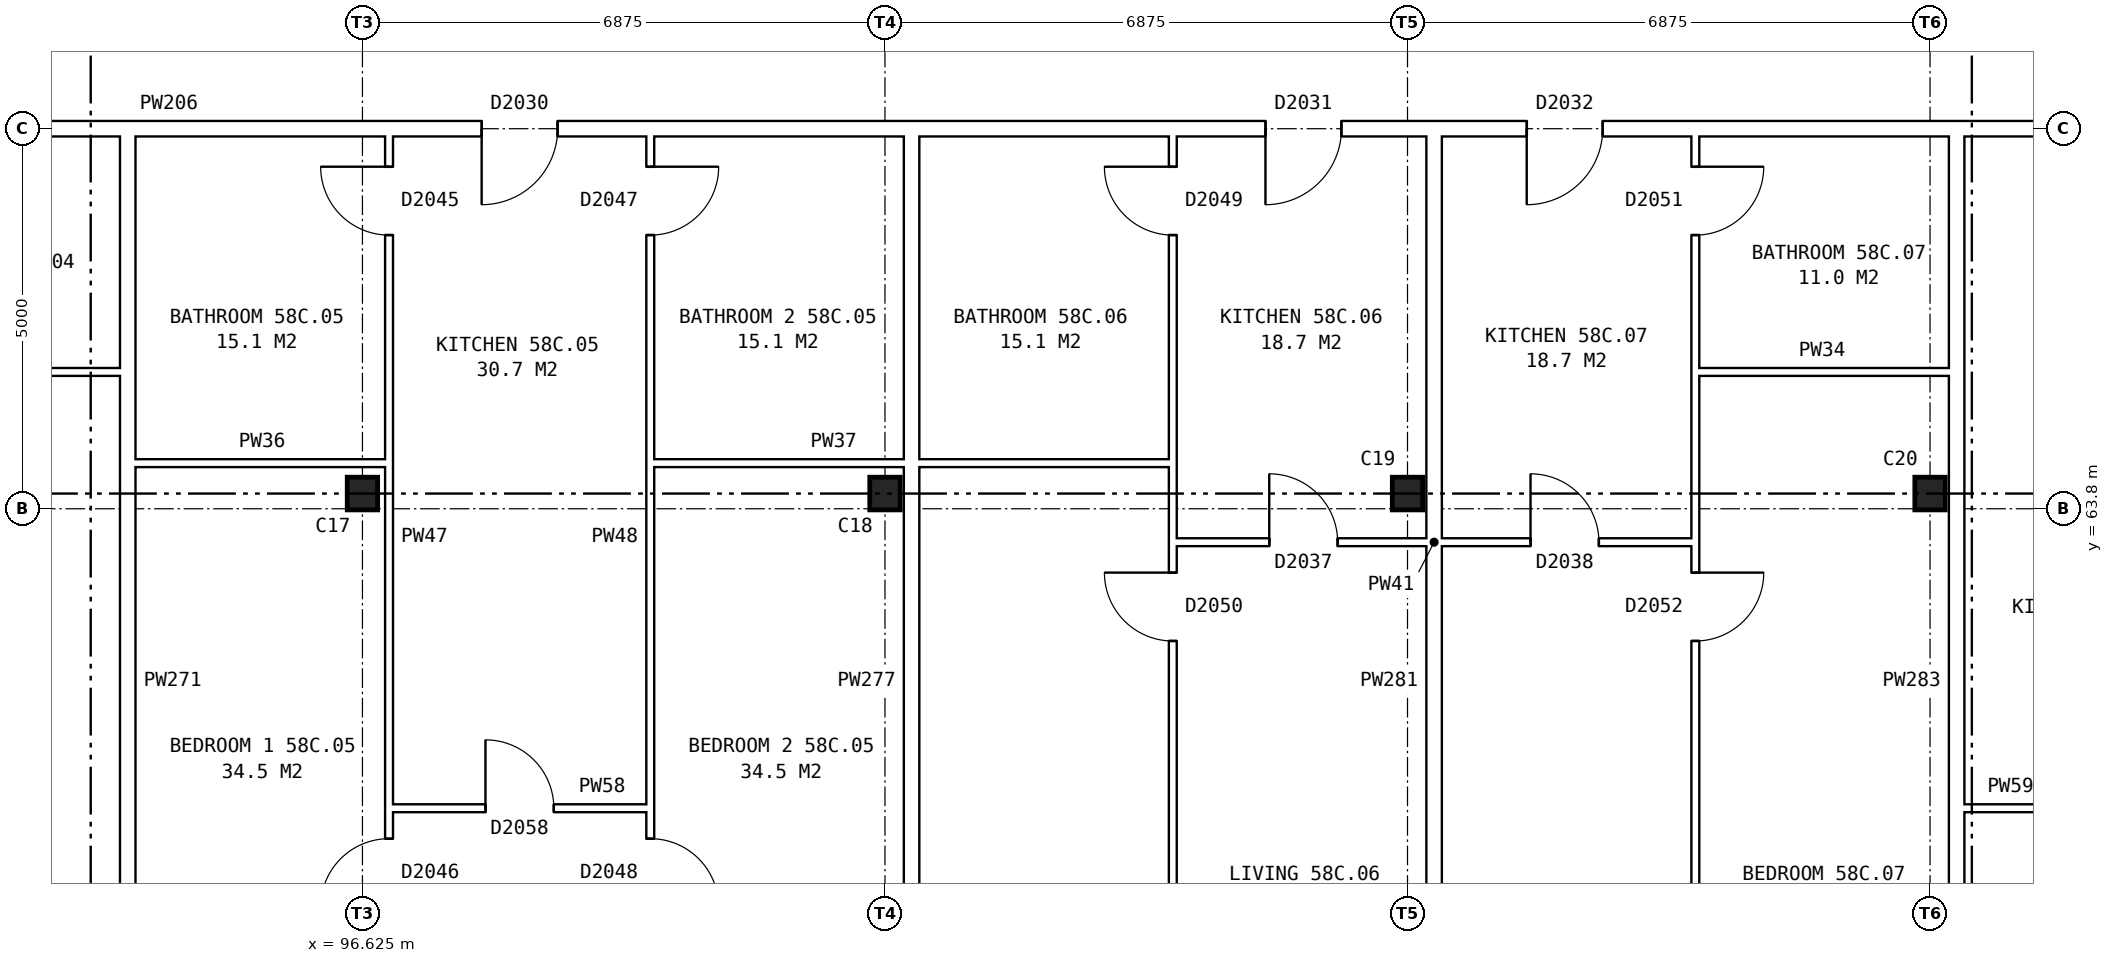
"""IFC4 building model, lengths in metres.
Left out: names, types, materials, properties, quantities, classifications, styles, units other than length and angle.
Written with IfcOpenShell. Run it as: python <this file> out.ifc"""

import sys

from ifc_helpers import new_model, si_unit, direction, frame, frame_2d, origin, origin_2d, place, context, subcontext, project, spatial, rectangle, i_section, extrude, element, fill, save


model = new_model("IFC4")
c1 = context("Model", 3, precision=1e-05, world=origin(), true_north=direction((0.0, 1.0)))
c2 = subcontext(c1, "Body", "Model", "MODEL_VIEW")
j1 = project(units=[si_unit("LENGTHUNIT", "METRE"), si_unit("PLANEANGLEUNIT", "RADIAN")], contexts=[c1])
p1 = place(None, origin())
s1 = spatial("IfcSite", under=j1, at=p1, CompositionType="ELEMENT")
p2 = place(p1, origin())
s2 = spatial("IfcBuilding", under=s1, at=p2, CompositionType="ELEMENT")
p3 = place(p2, frame((0.0, 0.0, 205.9)))
s3 = spatial("IfcBuildingStorey", under=s2, at=p3, CompositionType="ELEMENT", Elevation=205.9)
for number, where, z_axis, x_axis in (
    (1, (96.625, 64.0, 0.0), (0.0, 0.0, 1.0), (1.0, 0.0, 0.0)),
    (2, (103.5, 64.0, 0.0), (0.0, 0.0, 1.0), (1.0, 0.0, 0.0)),
    (3, (110.375, 64.0, 0.0), (0.0, 0.0, 1.0), (1.0, 0.0, 0.0)),
    (4, (117.25, 64.0, 0.0), (0.0, 0.0, 1.0), (1.0, 0.0, 0.0)),
):
    element("IfcColumn", number, at=place(p3, frame(where, z_axis=z_axis, x_axis=x_axis)), inside=s3, PredefinedType="COLUMN", context=c2, shape_type="SweptSolid", body=[
        extrude(i_section(OverallWidth=0.4, OverallDepth=0.43, WebThickness=0.04, FlangeThickness=0.04, at=origin_2d()), origin(), (0.0, 0.0, 1.0), 2.85),
    ])
p4 = place(p3, frame((96.975, 59.86, 0.0), z_axis=(0.0, 0.0, 1.0), x_axis=(1.0, 0.0, 0.0)))
e5 = element("IfcWall", 5, at=p4, inside=s3, PredefinedType="PARTITIONING", context=c2, shape_type="SweptSolid", body=[
    extrude(rectangle(XDim=3.437, YDim=0.1, at=frame_2d((1.719, 0.0))), origin(), (0.0, 0.0, 1.0), 2.85),
])
p5 = place(p4, frame((1.269, 0.0, 0.0)))
e6 = element("IfcOpeningElement", 6, at=p5, cuts=e5, PredefinedType="OPENING", context=c2, shape_type="SweptSolid", body=[
    extrude(rectangle(XDim=0.9, YDim=2.1, at=frame_2d((0.45, 1.05))), frame((0.0, 0.06, 0.0), z_axis=(0.0, -1.0, 0.0), x_axis=(1.0, 0.0, 0.0)), (0.0, 0.0, 1.0), 0.12),
])
p6 = place(p3, frame((117.7, 59.86, 0.0), z_axis=(0.0, 0.0, 1.0), x_axis=(1.0, 0.0, 0.0)))
e7 = element("IfcWall", 7, at=p6, inside=s3, PredefinedType="PARTITIONING", context=c2, shape_type="SweptSolid", body=[
    extrude(rectangle(XDim=3.337, YDim=0.1, at=frame_2d((1.668, 0.0))), origin(), (0.0, 0.0, 1.0), 2.85),
])
p7 = place(p6, frame((1.219, 0.0, 0.0)))
e8 = element("IfcOpeningElement", 8, at=p7, cuts=e7, PredefinedType="OPENING", context=c2, shape_type="SweptSolid", body=[
    extrude(rectangle(XDim=0.9, YDim=2.1, at=frame_2d((0.45, 1.05))), frame((0.0, 0.06, 0.0), z_axis=(0.0, -1.0, 0.0), x_axis=(1.0, 0.0, 0.0)), (0.0, 0.0, 1.0), 0.12),
])
p8 = place(p3, frame((107.287, 63.36, 0.0), z_axis=(0.0, 0.0, 1.0), x_axis=(1.0, 0.0, 0.0)))
e9 = element("IfcWall", 9, at=p8, inside=s3, PredefinedType="PARTITIONING", context=c2, shape_type="SweptSolid", body=[
    extrude(rectangle(XDim=6.875, YDim=0.1, at=frame_2d((3.438, 0.0))), origin(), (0.0, 0.0, 1.0), 2.85),
])
p9 = place(p8, frame((1.269, 0.0, 0.0)))
e10 = element("IfcOpeningElement", 10, at=p9, cuts=e9, PredefinedType="OPENING", context=c2, shape_type="SweptSolid", body=[
    extrude(rectangle(XDim=0.9, YDim=2.1, at=frame_2d((0.45, 1.05))), frame((0.0, 0.06, 0.0), z_axis=(0.0, -1.0, 0.0), x_axis=(1.0, 0.0, 0.0)), (0.0, 0.0, 1.0), 0.12),
])
p10 = place(p8, frame((4.707, 0.0, 0.0)))
e11 = element("IfcOpeningElement", 11, at=p10, cuts=e9, PredefinedType="OPENING", context=c2, shape_type="SweptSolid", body=[
    extrude(rectangle(XDim=0.9, YDim=2.1, at=frame_2d((0.45, 1.05))), frame((0.0, 0.06, 0.0), z_axis=(0.0, -1.0, 0.0), x_axis=(1.0, 0.0, 0.0)), (0.0, 0.0, 1.0), 0.12),
])
p11 = place(p3, frame((93.637, 64.4, 0.0), z_axis=(0.0, 0.0, 1.0), x_axis=(1.0, 0.0, 0.0)))
e12 = element("IfcWall", 12, at=p11, inside=s3, PredefinedType="PARTITIONING", context=c2, shape_type="SweptSolid", body=[
    extrude(rectangle(XDim=3.338, YDim=0.1, at=frame_2d((1.669, 0.0))), origin(), (0.0, 0.0, 1.0), 2.85),
])
p12 = place(p3, frame((100.412, 64.4, 0.0), z_axis=(0.0, 0.0, 1.0), x_axis=(1.0, 0.0, 0.0)))
e13 = element("IfcWall", 13, at=p12, inside=s3, PredefinedType="PARTITIONING", context=c2, shape_type="SweptSolid", body=[
    extrude(rectangle(XDim=6.875, YDim=0.1, at=frame_2d((3.438, 0.0))), origin(), (0.0, 0.0, 1.0), 2.85),
])
p13 = place(p3, frame((90.1, 65.6, 0.0), z_axis=(0.0, 0.0, 1.0), x_axis=(1.0, 0.0, 0.0)))
e14 = element("IfcWall", 14, at=p13, inside=s3, PredefinedType="PARTITIONING", context=c2, shape_type="SweptSolid", body=[
    extrude(rectangle(XDim=3.337, YDim=0.1, at=frame_2d((1.668, 0.0))), origin(), (0.0, 0.0, 1.0), 2.85),
])
p14 = place(p3, frame((114.162, 65.6, 0.0), z_axis=(0.0, 0.0, 1.0), x_axis=(1.0, 0.0, 0.0)))
e15 = element("IfcWall", 15, at=p14, inside=s3, PredefinedType="PARTITIONING", context=c2, shape_type="SweptSolid", body=[
    extrude(rectangle(XDim=3.338, YDim=0.1, at=frame_2d((1.669, 0.0))), origin(), (0.0, 0.0, 1.0), 2.85),
])
p15 = place(p3, frame((75.64, 68.8, 0.0), z_axis=(0.0, 0.0, 1.0), x_axis=(1.0, 0.0, 0.0)))
e16 = element("IfcWall", 16, at=p15, inside=s3, PredefinedType="PARTITIONING", context=c2, shape_type="SweptSolid", body=[
    extrude(rectangle(XDim=55.72, YDim=0.2, at=frame_2d((27.86, 0.0))), origin(), (0.0, 0.0, 1.0), 2.85),
])
p16 = place(p15, frame((5.191, 0.0, 0.0)))
e17 = element("IfcOpeningElement", 17, at=p16, cuts=e16, PredefinedType="OPENING", context=c2, shape_type="SweptSolid", body=[
    extrude(rectangle(XDim=1.0, YDim=2.1, at=frame_2d((0.5, 1.05))), frame((0.0, 0.11, 0.0), z_axis=(0.0, -1.0, 0.0), x_axis=(1.0, 0.0, 0.0)), (0.0, 0.0, 1.0), 0.22),
])
p17 = place(p15, frame((12.241, 0.0, 0.0)))
e18 = element("IfcOpeningElement", 18, at=p17, cuts=e16, PredefinedType="OPENING", context=c2, shape_type="SweptSolid", body=[
    extrude(rectangle(XDim=1.0, YDim=2.1, at=frame_2d((0.5, 1.05))), frame((0.0, 0.11, 0.0), z_axis=(0.0, -1.0, 0.0), x_axis=(1.0, 0.0, 0.0)), (0.0, 0.0, 1.0), 0.22),
])
p18 = place(p15, frame((22.553, 0.0, 0.0)))
e19 = element("IfcOpeningElement", 19, at=p18, cuts=e16, PredefinedType="OPENING", context=c2, shape_type="SweptSolid", body=[
    extrude(rectangle(XDim=1.0, YDim=2.1, at=frame_2d((0.5, 1.05))), frame((0.0, 0.11, 0.0), z_axis=(0.0, -1.0, 0.0), x_axis=(1.0, 0.0, 0.0)), (0.0, 0.0, 1.0), 0.22),
])
p19 = place(p15, frame((32.866, 0.0, 0.0)))
e20 = element("IfcOpeningElement", 20, at=p19, cuts=e16, PredefinedType="OPENING", context=c2, shape_type="SweptSolid", body=[
    extrude(rectangle(XDim=1.0, YDim=2.1, at=frame_2d((0.5, 1.05))), frame((0.0, 0.11, 0.0), z_axis=(0.0, -1.0, 0.0), x_axis=(1.0, 0.0, 0.0)), (0.0, 0.0, 1.0), 0.22),
])
p20 = place(p15, frame((36.303, 0.0, 0.0)))
e21 = element("IfcOpeningElement", 21, at=p20, cuts=e16, PredefinedType="OPENING", context=c2, shape_type="SweptSolid", body=[
    extrude(rectangle(XDim=1.0, YDim=2.1, at=frame_2d((0.5, 1.05))), frame((0.0, 0.11, 0.0), z_axis=(0.0, -1.0, 0.0), x_axis=(1.0, 0.0, 0.0)), (0.0, 0.0, 1.0), 0.22),
])
p21 = place(p15, frame((43.178, 0.0, 0.0)))
e22 = element("IfcOpeningElement", 22, at=p21, cuts=e16, PredefinedType="OPENING", context=c2, shape_type="SweptSolid", body=[
    extrude(rectangle(XDim=1.0, YDim=2.1, at=frame_2d((0.5, 1.05))), frame((0.0, 0.11, 0.0), z_axis=(0.0, -1.0, 0.0), x_axis=(1.0, 0.0, 0.0)), (0.0, 0.0, 1.0), 0.22),
])
p22 = place(p15, frame((50.053, 0.0, 0.0)))
e23 = element("IfcOpeningElement", 23, at=p22, cuts=e16, PredefinedType="OPENING", context=c2, shape_type="SweptSolid", body=[
    extrude(rectangle(XDim=1.0, YDim=2.1, at=frame_2d((0.5, 1.05))), frame((0.0, 0.11, 0.0), z_axis=(0.0, -1.0, 0.0), x_axis=(1.0, 0.0, 0.0)), (0.0, 0.0, 1.0), 0.22),
])
p23 = place(p3, frame((93.537, 54.36, 0.0), z_axis=(0.0, 0.0, 1.0), x_axis=(0.0, 1.0, 0.0)))
e24 = element("IfcWall", 24, at=p23, inside=s3, PredefinedType="PARTITIONING", context=c2, shape_type="SweptSolid", body=[
    extrude(rectangle(XDim=14.34, YDim=0.2, at=frame_2d((7.17, 0.0))), origin(), (0.0, 0.0, 1.0), 2.85),
])
p24 = place(p3, frame((96.975, 54.36, 0.0), z_axis=(0.0, 0.0, 1.0), x_axis=(0.0, 1.0, 0.0)))
e25 = element("IfcWall", 25, at=p24, inside=s3, PredefinedType="PARTITIONING", context=c2, shape_type="SweptSolid", body=[
    extrude(rectangle(XDim=14.34, YDim=0.1, at=frame_2d((7.17, 0.0))), origin(), (0.0, 0.0, 1.0), 2.85),
])
p25 = place(p24, frame((4.2, 0.0, 0.0)))
e26 = element("IfcOpeningElement", 26, at=p25, cuts=e25, PredefinedType="OPENING", context=c2, shape_type="SweptSolid", body=[
    extrude(rectangle(XDim=0.9, YDim=2.1, at=frame_2d((0.45, 1.05))), frame((0.0, 0.06, 0.0), z_axis=(0.0, -1.0, 0.0), x_axis=(1.0, 0.0, 0.0)), (0.0, 0.0, 1.0), 0.12),
])
p26 = place(p24, frame((13.04, 0.0, 0.0)))
e27 = element("IfcOpeningElement", 27, at=p26, cuts=e25, PredefinedType="OPENING", context=c2, shape_type="SweptSolid", body=[
    extrude(rectangle(XDim=0.9, YDim=2.1, at=frame_2d((0.45, 1.05))), frame((0.0, 0.06, 0.0), z_axis=(0.0, -1.0, 0.0), x_axis=(1.0, 0.0, 0.0)), (0.0, 0.0, 1.0), 0.12),
])
p27 = place(p3, frame((100.412, 54.36, 0.0), z_axis=(0.0, 0.0, 1.0), x_axis=(0.0, 1.0, 0.0)))
e28 = element("IfcWall", 28, at=p27, inside=s3, PredefinedType="PARTITIONING", context=c2, shape_type="SweptSolid", body=[
    extrude(rectangle(XDim=14.34, YDim=0.1, at=frame_2d((7.17, 0.0))), origin(), (0.0, 0.0, 1.0), 2.85),
])
p28 = place(p27, frame((4.2, 0.0, 0.0)))
e29 = element("IfcOpeningElement", 29, at=p28, cuts=e28, PredefinedType="OPENING", context=c2, shape_type="SweptSolid", body=[
    extrude(rectangle(XDim=0.9, YDim=2.1, at=frame_2d((0.45, 1.05))), frame((0.0, 0.06, 0.0), z_axis=(0.0, -1.0, 0.0), x_axis=(1.0, 0.0, 0.0)), (0.0, 0.0, 1.0), 0.12),
])
p29 = place(p27, frame((13.04, 0.0, 0.0)))
e30 = element("IfcOpeningElement", 30, at=p29, cuts=e28, PredefinedType="OPENING", context=c2, shape_type="SweptSolid", body=[
    extrude(rectangle(XDim=0.9, YDim=2.1, at=frame_2d((0.45, 1.05))), frame((0.0, 0.06, 0.0), z_axis=(0.0, -1.0, 0.0), x_axis=(1.0, 0.0, 0.0)), (0.0, 0.0, 1.0), 0.12),
])
p30 = place(p3, frame((103.85, 54.36, 0.0), z_axis=(0.0, 0.0, 1.0), x_axis=(0.0, 1.0, 0.0)))
e31 = element("IfcWall", 31, at=p30, inside=s3, PredefinedType="PARTITIONING", context=c2, shape_type="SweptSolid", body=[
    extrude(rectangle(XDim=14.34, YDim=0.2, at=frame_2d((7.17, 0.0))), origin(), (0.0, 0.0, 1.0), 2.85),
])
p31 = place(p3, frame((107.287, 54.36, 0.0), z_axis=(0.0, 0.0, 1.0), x_axis=(0.0, 1.0, 0.0)))
e32 = element("IfcWall", 32, at=p31, inside=s3, PredefinedType="PARTITIONING", context=c2, shape_type="SweptSolid", body=[
    extrude(rectangle(XDim=14.34, YDim=0.1, at=frame_2d((7.17, 0.0))), origin(), (0.0, 0.0, 1.0), 2.85),
])
p32 = place(p31, frame((7.7, 0.0, 0.0)))
e33 = element("IfcOpeningElement", 33, at=p32, cuts=e32, PredefinedType="OPENING", context=c2, shape_type="SweptSolid", body=[
    extrude(rectangle(XDim=0.9, YDim=2.1, at=frame_2d((0.45, 1.05))), frame((0.0, 0.06, 0.0), z_axis=(0.0, -1.0, 0.0), x_axis=(1.0, 0.0, 0.0)), (0.0, 0.0, 1.0), 0.12),
])
p33 = place(p31, frame((13.04, 0.0, 0.0)))
e34 = element("IfcOpeningElement", 34, at=p33, cuts=e32, PredefinedType="OPENING", context=c2, shape_type="SweptSolid", body=[
    extrude(rectangle(XDim=0.9, YDim=2.1, at=frame_2d((0.45, 1.05))), frame((0.0, 0.06, 0.0), z_axis=(0.0, -1.0, 0.0), x_axis=(1.0, 0.0, 0.0)), (0.0, 0.0, 1.0), 0.12),
])
p34 = place(p3, frame((110.725, 54.36, 0.0), z_axis=(0.0, 0.0, 1.0), x_axis=(0.0, 1.0, 0.0)))
e35 = element("IfcWall", 35, at=p34, inside=s3, PredefinedType="PARTITIONING", context=c2, shape_type="SweptSolid", body=[
    extrude(rectangle(XDim=14.34, YDim=0.2, at=frame_2d((7.17, 0.0))), origin(), (0.0, 0.0, 1.0), 2.85),
])
p35 = place(p3, frame((114.162, 54.36, 0.0), z_axis=(0.0, 0.0, 1.0), x_axis=(0.0, 1.0, 0.0)))
e36 = element("IfcWall", 36, at=p35, inside=s3, PredefinedType="PARTITIONING", context=c2, shape_type="SweptSolid", body=[
    extrude(rectangle(XDim=14.34, YDim=0.1, at=frame_2d((7.17, 0.0))), origin(), (0.0, 0.0, 1.0), 2.85),
])
p36 = place(p35, frame((7.7, 0.0, 0.0)))
e37 = element("IfcOpeningElement", 37, at=p36, cuts=e36, PredefinedType="OPENING", context=c2, shape_type="SweptSolid", body=[
    extrude(rectangle(XDim=0.9, YDim=2.1, at=frame_2d((0.45, 1.05))), frame((0.0, 0.06, 0.0), z_axis=(0.0, -1.0, 0.0), x_axis=(1.0, 0.0, 0.0)), (0.0, 0.0, 1.0), 0.12),
])
p37 = place(p35, frame((13.04, 0.0, 0.0)))
e38 = element("IfcOpeningElement", 38, at=p37, cuts=e36, PredefinedType="OPENING", context=c2, shape_type="SweptSolid", body=[
    extrude(rectangle(XDim=0.9, YDim=2.1, at=frame_2d((0.45, 1.05))), frame((0.0, 0.06, 0.0), z_axis=(0.0, -1.0, 0.0), x_axis=(1.0, 0.0, 0.0)), (0.0, 0.0, 1.0), 0.12),
])
p38 = place(p3, frame((117.6, 54.36, 0.0), z_axis=(0.0, 0.0, 1.0), x_axis=(0.0, 1.0, 0.0)))
e39 = element("IfcWall", 39, at=p38, inside=s3, PredefinedType="PARTITIONING", context=c2, shape_type="SweptSolid", body=[
    extrude(rectangle(XDim=14.34, YDim=0.2, at=frame_2d((7.17, 0.0))), origin(), (0.0, 0.0, 1.0), 2.85),
])
p39 = place(p25, origin())
e40 = element("IfcDoor", 40, at=p39, inside=s3, OperationType="SINGLE_SWING_LEFT", PredefinedType="DOOR", context=c2, shape_type="SweptSolid", body=[
    extrude(rectangle(XDim=0.9, YDim=2.1, at=frame_2d((0.45, 1.05))), frame((0.0, 0.025, 0.0), z_axis=(0.0, -1.0, 0.0), x_axis=(1.0, 0.0, 0.0)), (0.0, 0.0, 1.0), 0.05),
])
fill(e26, e40)
p40 = place(p28, frame((0.9, 0.0, 0.0), z_axis=(0.0, 0.0, 1.0), x_axis=(-1.0, 0.0, 0.0)))
e41 = element("IfcDoor", 41, at=p40, inside=s3, OperationType="SINGLE_SWING_RIGHT", PredefinedType="DOOR", context=c2, shape_type="SweptSolid", body=[
    extrude(rectangle(XDim=0.9, YDim=2.1, at=frame_2d((0.45, 1.05))), frame((0.0, 0.025, 0.0), z_axis=(0.0, -1.0, 0.0), x_axis=(1.0, 0.0, 0.0)), (0.0, 0.0, 1.0), 0.05),
])
fill(e29, e41)
p41 = place(p18, frame((1.0, 0.0, 0.0), z_axis=(0.0, 0.0, 1.0), x_axis=(-1.0, 0.0, 0.0)))
e42 = element("IfcDoor", 42, at=p41, inside=s3, OperationType="SINGLE_SWING_RIGHT", PredefinedType="DOOR", context=c2, shape_type="SweptSolid", body=[
    extrude(rectangle(XDim=1.0, YDim=2.1, at=frame_2d((0.5, 1.05))), frame((0.0, 0.025, 0.0), z_axis=(0.0, -1.0, 0.0), x_axis=(1.0, 0.0, 0.0)), (0.0, 0.0, 1.0), 0.05),
])
fill(e19, e42)
p42 = place(p5, origin())
e43 = element("IfcDoor", 43, at=p42, inside=s3, OperationType="SINGLE_SWING_LEFT", PredefinedType="DOOR", context=c2, shape_type="SweptSolid", body=[
    extrude(rectangle(XDim=0.9, YDim=2.1, at=frame_2d((0.45, 1.05))), frame((0.0, 0.025, 0.0), z_axis=(0.0, -1.0, 0.0), x_axis=(1.0, 0.0, 0.0)), (0.0, 0.0, 1.0), 0.05),
])
fill(e6, e43)
p43 = place(p26, origin())
e44 = element("IfcDoor", 44, at=p43, inside=s3, OperationType="SINGLE_SWING_RIGHT", PredefinedType="DOOR", context=c2, shape_type="SweptSolid", body=[
    extrude(rectangle(XDim=0.9, YDim=2.1, at=frame_2d((0.45, 1.05))), frame((0.0, 0.025, 0.0), z_axis=(0.0, -1.0, 0.0), x_axis=(1.0, 0.0, 0.0)), (0.0, 0.0, 1.0), 0.05),
])
fill(e27, e44)
p44 = place(p29, frame((0.9, 0.0, 0.0), z_axis=(0.0, 0.0, 1.0), x_axis=(-1.0, 0.0, 0.0)))
e45 = element("IfcDoor", 45, at=p44, inside=s3, OperationType="SINGLE_SWING_LEFT", PredefinedType="DOOR", context=c2, shape_type="SweptSolid", body=[
    extrude(rectangle(XDim=0.9, YDim=2.1, at=frame_2d((0.45, 1.05))), frame((0.0, 0.025, 0.0), z_axis=(0.0, -1.0, 0.0), x_axis=(1.0, 0.0, 0.0)), (0.0, 0.0, 1.0), 0.05),
])
fill(e30, e45)
p45 = place(p32, origin())
e46 = element("IfcDoor", 46, at=p45, inside=s3, OperationType="SINGLE_SWING_RIGHT", PredefinedType="DOOR", context=c2, shape_type="SweptSolid", body=[
    extrude(rectangle(XDim=0.9, YDim=2.1, at=frame_2d((0.45, 1.05))), frame((0.0, 0.025, 0.0), z_axis=(0.0, -1.0, 0.0), x_axis=(1.0, 0.0, 0.0)), (0.0, 0.0, 1.0), 0.05),
])
fill(e33, e46)
p46 = place(p19, frame((1.0, 0.0, 0.0), z_axis=(0.0, 0.0, 1.0), x_axis=(-1.0, 0.0, 0.0)))
e47 = element("IfcDoor", 47, at=p46, inside=s3, OperationType="SINGLE_SWING_RIGHT", PredefinedType="DOOR", context=c2, shape_type="SweptSolid", body=[
    extrude(rectangle(XDim=1.0, YDim=2.1, at=frame_2d((0.5, 1.05))), frame((0.0, 0.025, 0.0), z_axis=(0.0, -1.0, 0.0), x_axis=(1.0, 0.0, 0.0)), (0.0, 0.0, 1.0), 0.05),
])
fill(e20, e47)
p47 = place(p9, origin())
e48 = element("IfcDoor", 48, at=p47, inside=s3, OperationType="SINGLE_SWING_LEFT", PredefinedType="DOOR", context=c2, shape_type="SweptSolid", body=[
    extrude(rectangle(XDim=0.9, YDim=2.1, at=frame_2d((0.45, 1.05))), frame((0.0, 0.025, 0.0), z_axis=(0.0, -1.0, 0.0), x_axis=(1.0, 0.0, 0.0)), (0.0, 0.0, 1.0), 0.05),
])
fill(e10, e48)
p48 = place(p33, origin())
e49 = element("IfcDoor", 49, at=p48, inside=s3, OperationType="SINGLE_SWING_RIGHT", PredefinedType="DOOR", context=c2, shape_type="SweptSolid", body=[
    extrude(rectangle(XDim=0.9, YDim=2.1, at=frame_2d((0.45, 1.05))), frame((0.0, 0.025, 0.0), z_axis=(0.0, -1.0, 0.0), x_axis=(1.0, 0.0, 0.0)), (0.0, 0.0, 1.0), 0.05),
])
fill(e34, e49)
p49 = place(p36, frame((0.9, 0.0, 0.0), z_axis=(0.0, 0.0, 1.0), x_axis=(-1.0, 0.0, 0.0)))
e50 = element("IfcDoor", 50, at=p49, inside=s3, OperationType="SINGLE_SWING_LEFT", PredefinedType="DOOR", context=c2, shape_type="SweptSolid", body=[
    extrude(rectangle(XDim=0.9, YDim=2.1, at=frame_2d((0.45, 1.05))), frame((0.0, 0.025, 0.0), z_axis=(0.0, -1.0, 0.0), x_axis=(1.0, 0.0, 0.0)), (0.0, 0.0, 1.0), 0.05),
])
fill(e37, e50)
p50 = place(p20, frame((1.0, 0.0, 0.0), z_axis=(0.0, 0.0, 1.0), x_axis=(-1.0, 0.0, 0.0)))
e51 = element("IfcDoor", 51, at=p50, inside=s3, OperationType="SINGLE_SWING_RIGHT", PredefinedType="DOOR", context=c2, shape_type="SweptSolid", body=[
    extrude(rectangle(XDim=1.0, YDim=2.1, at=frame_2d((0.5, 1.05))), frame((0.0, 0.025, 0.0), z_axis=(0.0, -1.0, 0.0), x_axis=(1.0, 0.0, 0.0)), (0.0, 0.0, 1.0), 0.05),
])
fill(e21, e51)
p51 = place(p10, origin())
e52 = element("IfcDoor", 52, at=p51, inside=s3, OperationType="SINGLE_SWING_LEFT", PredefinedType="DOOR", context=c2, shape_type="SweptSolid", body=[
    extrude(rectangle(XDim=0.9, YDim=2.1, at=frame_2d((0.45, 1.05))), frame((0.0, 0.025, 0.0), z_axis=(0.0, -1.0, 0.0), x_axis=(1.0, 0.0, 0.0)), (0.0, 0.0, 1.0), 0.05),
])
fill(e11, e52)
p52 = place(p37, frame((0.9, 0.0, 0.0), z_axis=(0.0, 0.0, 1.0), x_axis=(-1.0, 0.0, 0.0)))
e53 = element("IfcDoor", 53, at=p52, inside=s3, OperationType="SINGLE_SWING_LEFT", PredefinedType="DOOR", context=c2, shape_type="SweptSolid", body=[
    extrude(rectangle(XDim=0.9, YDim=2.1, at=frame_2d((0.45, 1.05))), frame((0.0, 0.025, 0.0), z_axis=(0.0, -1.0, 0.0), x_axis=(1.0, 0.0, 0.0)), (0.0, 0.0, 1.0), 0.05),
])
fill(e38, e53)
save(model, sys.argv[1])
